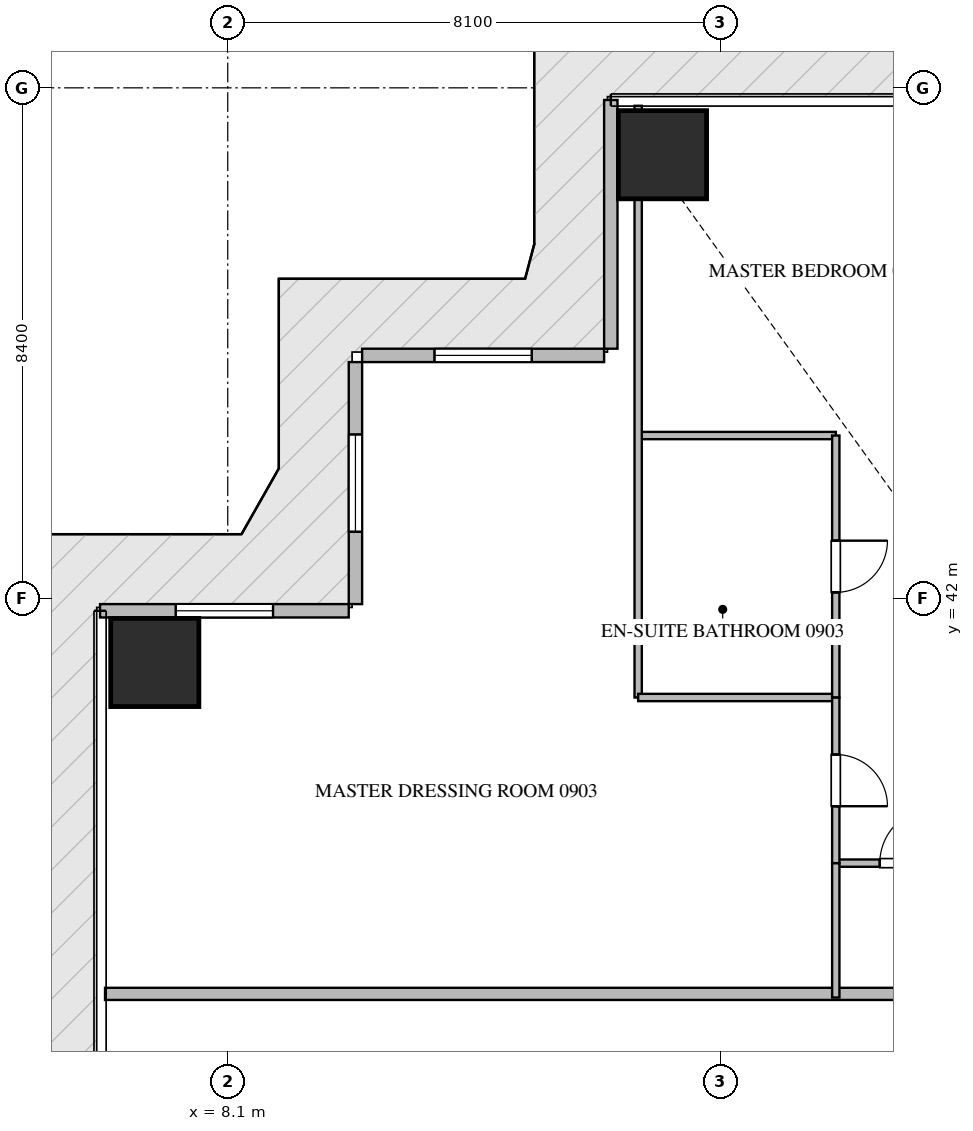
"""IFC4 building model, lengths in metres.
Left out: names, types, materials, properties, quantities, classifications, styles, units other than length and angle.
Written with IfcOpenShell. Run it as: python <this file> out.ifc"""

import sys

from ifc_helpers import new_model, si_unit, direction, frame, frame_2d, origin, origin_2d, place, context, subcontext, project, spatial, rectangle, extrude, source, transform, mapped, element, fill, save


model = new_model("IFC4")
c1 = context("Model", 3, precision=1e-05, world=origin(), true_north=direction((0.0, 1.0)))
c2 = subcontext(c1, "Body", "Model", "MODEL_VIEW")
j1 = project(units=[si_unit("LENGTHUNIT", "METRE"), si_unit("PLANEANGLEUNIT", "RADIAN")], contexts=[c1])
p1 = place(None, origin())
s1 = spatial("IfcSite", under=j1, at=p1, CompositionType="ELEMENT")
p2 = place(p1, origin())
s2 = spatial("IfcBuilding", under=s1, at=p2, CompositionType="ELEMENT")
p3 = place(p2, frame((0.0, 0.0, 41.7)))
s3 = spatial("IfcBuildingStorey", under=s2, at=p3, CompositionType="ELEMENT", Elevation=41.7)
m1 = source(origin(), c2, "Body", "SweptSolid", [
    extrude(rectangle(XDim=1.45, YDim=1.45, at=origin_2d()), origin(), (0.0, 0.0, 1.0), 3.75),
])
for number, where, z_axis, x_axis in (
    (1, (15.25, 49.3, -0.26), (0.0, 0.0, 1.0), (1.0, 0.0, 0.0)),
    (2, (6.9, 40.95, -0.26), (0.0, 0.0, 1.0), (1.0, 0.0, 0.0)),
):
    element("IfcColumn", number, at=place(p3, frame(where, z_axis=z_axis, x_axis=x_axis)), inside=s3, PredefinedType="COLUMN", context=c2, shape_type="MappedRepresentation", body=[
        mapped(m1, transform((0.0, 0.0, 0.0), scale=1.0)),
    ])
p4 = place(p3, frame((14.4, 50.2, 0.0), z_axis=(0.0, 0.0, 1.0), x_axis=(0.0, -1.0, 0.0)))
e3 = element("IfcWall", 3, at=p4, inside=s3, PredefinedType="ELEMENTEDWALL", context=c2, shape_type="SweptSolid", body=[
    extrude(rectangle(XDim=4.09, YDim=0.22, at=frame_2d((2.045, 0.0))), origin(), (0.0, 0.0, 1.0), 3.475),
])
p5 = place(p3, frame((14.29, 46.0, 0.0), z_axis=(0.0, 0.0, 1.0), x_axis=(-1.0, 0.0, 0.0)))
e4 = element("IfcWall", 4, at=p5, inside=s3, PredefinedType="ELEMENTEDWALL", context=c2, shape_type="SweptSolid", body=[
    extrude(rectangle(XDim=3.98, YDim=0.22, at=frame_2d((1.99, 0.0))), origin(), (0.0, 0.0, 1.0), 3.475),
])
p6 = place(p5, frame((1.19, 0.0, 0.65)))
e5 = element("IfcOpeningElement", 5, at=p6, cuts=e4, PredefinedType="OPENING", context=c2, shape_type="SweptSolid", body=[
    extrude(rectangle(XDim=1.6, YDim=2.1, at=frame_2d((0.8, 1.05))), frame((0.0, 0.12, 0.0), z_axis=(0.0, -1.0, 0.0), x_axis=(1.0, 0.0, 0.0)), (0.0, 0.0, 1.0), 0.24),
])
p7 = place(p3, frame((10.2, 45.89, 0.0), z_axis=(0.0, 0.0, 1.0), x_axis=(0.0, -1.0, 0.0)))
e6 = element("IfcWall", 6, at=p7, inside=s3, PredefinedType="ELEMENTEDWALL", context=c2, shape_type="SweptSolid", body=[
    extrude(rectangle(XDim=3.98, YDim=0.22, at=frame_2d((1.99, 0.0))), origin(), (0.0, 0.0, 1.0), 3.475),
])
p8 = place(p7, frame((1.19, 0.0, 0.65)))
e7 = element("IfcOpeningElement", 7, at=p8, cuts=e6, PredefinedType="OPENING", context=c2, shape_type="SweptSolid", body=[
    extrude(rectangle(XDim=1.6, YDim=2.1, at=frame_2d((0.8, 1.05))), frame((0.0, 0.12, 0.0), z_axis=(0.0, -1.0, 0.0), x_axis=(1.0, 0.0, 0.0)), (0.0, 0.0, 1.0), 0.24),
])
p9 = place(p3, frame((10.09, 41.8, 0.0), z_axis=(0.0, 0.0, 1.0), x_axis=(-1.0, 0.0, 0.0)))
e8 = element("IfcWall", 8, at=p9, inside=s3, PredefinedType="ELEMENTEDWALL", context=c2, shape_type="SweptSolid", body=[
    extrude(rectangle(XDim=4.09, YDim=0.22, at=frame_2d((2.045, 0.0))), origin(), (0.0, 0.0, 1.0), 3.475),
])
p10 = place(p9, frame((1.245, 0.0, 0.65)))
e9 = element("IfcOpeningElement", 9, at=p10, cuts=e8, PredefinedType="OPENING", context=c2, shape_type="SweptSolid", body=[
    extrude(rectangle(XDim=1.6, YDim=2.1, at=frame_2d((0.8, 1.05))), frame((0.0, 0.12, 0.0), z_axis=(0.0, -1.0, 0.0), x_axis=(1.0, 0.0, 0.0)), (0.0, 0.0, 1.0), 0.24),
])
p11 = place(p3, frame((6.082, 35.5, 0.0), z_axis=(0.0, 0.0, 1.0), x_axis=(1.0, 0.0, 0.0)))
e10 = element("IfcWall", 10, at=p11, inside=s3, PredefinedType="PARTITIONING", context=c2, shape_type="SweptSolid", body=[
    extrude(rectangle(XDim=15.318, YDim=0.2, at=frame_2d((7.659, 0.0))), origin(), (0.0, 0.0, 1.0), 3.49),
])
p12 = place(p3, frame((18.1, 37.65, 0.0), z_axis=(0.0, 0.0, 1.0), x_axis=(1.0, 0.0, 0.0)))
e11 = element("IfcWall", 11, at=p12, inside=s3, PredefinedType="PARTITIONING", context=c2, shape_type="SweptSolid", body=[
    extrude(rectangle(XDim=2.348, YDim=0.12, at=frame_2d((1.174, 0.0))), origin(), (0.0, 0.0, 1.0), 3.49),
])
p13 = place(p12, frame((0.724, 0.0, 0.0)))
e12 = element("IfcOpeningElement", 12, at=p13, cuts=e11, PredefinedType="OPENING", context=c2, shape_type="SweptSolid", body=[
    extrude(rectangle(XDim=0.9, YDim=2.1, at=frame_2d((0.45, 1.05))), frame((0.0, 0.07, 0.0), z_axis=(0.0, -1.0, 0.0), x_axis=(1.0, 0.0, 0.0)), (0.0, 0.0, 1.0), 0.14),
])
p14 = place(p3, frame((14.85, 44.682, 0.0), z_axis=(0.0, 0.0, 1.0), x_axis=(1.0, 0.0, 0.0)))
e13 = element("IfcWall", 13, at=p14, inside=s3, PredefinedType="PARTITIONING", context=c2, shape_type="SweptSolid", body=[
    extrude(rectangle(XDim=3.25, YDim=0.12, at=frame_2d((1.625, 0.0))), origin(), (0.0, 0.0, 1.0), 3.49),
])
p15 = place(p3, frame((14.85, 50.105, 0.0), z_axis=(0.0, 0.0, 1.0), x_axis=(0.0, -1.0, 0.0)))
e14 = element("IfcWall", 14, at=p15, inside=s3, PredefinedType="PARTITIONING", context=c2, shape_type="SweptSolid", body=[
    extrude(rectangle(XDim=9.731, YDim=0.12, at=frame_2d((4.865, 0.0))), origin(), (0.0, 0.0, 1.0), 3.49),
])
p16 = place(p3, frame((14.85, 40.374, 0.0), z_axis=(0.0, 0.0, 1.0), x_axis=(1.0, 0.0, 0.0)))
e15 = element("IfcWall", 15, at=p16, inside=s3, PredefinedType="PARTITIONING", context=c2, shape_type="SweptSolid", body=[
    extrude(rectangle(XDim=3.25, YDim=0.12, at=frame_2d((1.625, 0.0))), origin(), (0.0, 0.0, 1.0), 3.49),
])
p17 = place(p3, frame((18.1, 44.682, 0.0), z_axis=(0.0, 0.0, 1.0), x_axis=(0.0, -1.0, 0.0)))
e16 = element("IfcWall", 16, at=p17, inside=s3, PredefinedType="PARTITIONING", context=c2, shape_type="SweptSolid", body=[
    extrude(rectangle(XDim=4.308, YDim=0.12, at=frame_2d((2.154, 0.0))), origin(), (0.0, 0.0, 1.0), 3.49),
])
p18 = place(p17, frame((1.729, 0.0, 0.0)))
e17 = element("IfcOpeningElement", 17, at=p18, cuts=e16, PredefinedType="OPENING", context=c2, shape_type="SweptSolid", body=[
    extrude(rectangle(XDim=0.85, YDim=2.1, at=frame_2d((0.425, 1.05))), frame((0.0, 0.07, 0.0), z_axis=(0.0, -1.0, 0.0), x_axis=(1.0, 0.0, 0.0)), (0.0, 0.0, 1.0), 0.14),
])
p19 = place(p3, frame((18.1, 40.372, 0.0), z_axis=(0.0, 0.0, 1.0), x_axis=(0.0, -1.0, 0.0)))
e18 = element("IfcWall", 18, at=p19, inside=s3, PredefinedType="PARTITIONING", context=c2, shape_type="SweptSolid", body=[
    extrude(rectangle(XDim=2.722, YDim=0.12, at=frame_2d((1.361, 0.0))), origin(), (0.0, 0.0, 1.0), 3.49),
])
p20 = place(p19, frame((0.936, 0.0, 0.0)))
e19 = element("IfcOpeningElement", 19, at=p20, cuts=e18, PredefinedType="OPENING", context=c2, shape_type="SweptSolid", body=[
    extrude(rectangle(XDim=0.85, YDim=2.1, at=frame_2d((0.425, 1.05))), frame((0.0, 0.07, 0.0), z_axis=(0.0, -1.0, 0.0), x_axis=(1.0, 0.0, 0.0)), (0.0, 0.0, 1.0), 0.14),
])
p21 = place(p3, frame((18.1, 37.648, 0.0), z_axis=(0.0, 0.0, 1.0), x_axis=(0.0, -1.0, 0.0)))
e20 = element("IfcWall", 20, at=p21, inside=s3, PredefinedType="PARTITIONING", context=c2, shape_type="SweptSolid", body=[
    extrude(rectangle(XDim=2.208, YDim=0.12, at=frame_2d((1.104, 0.0))), origin(), (0.0, 0.0, 1.0), 3.49),
])
m2 = source(origin(), c2, "Body", "SweptSolid", [
    extrude(rectangle(XDim=1.6, YDim=2.1, at=frame_2d((0.8, 1.05))), frame((0.0, 0.03, 0.0), z_axis=(0.0, -1.0, 0.0), x_axis=(1.0, 0.0, 0.0)), (0.0, 0.0, 1.0), 0.06),
])
p22 = place(p6, origin())
e21 = element("IfcWindow", 21, at=p22, inside=s3, PartitioningType="SINGLE_PANEL", PredefinedType="WINDOW", context=c2, shape_type="MappedRepresentation", body=[
    mapped(m2, transform((0.0, 0.0, 0.0), scale=1.0)),
])
fill(e5, e21)
p23 = place(p8, origin())
e22 = element("IfcWindow", 22, at=p23, inside=s3, PartitioningType="SINGLE_PANEL", PredefinedType="WINDOW", context=c2, shape_type="MappedRepresentation", body=[
    mapped(m2, transform((0.0, 0.0, 0.0), scale=1.0)),
])
fill(e7, e22)
p24 = place(p10, origin())
e23 = element("IfcWindow", 23, at=p24, inside=s3, PartitioningType="SINGLE_PANEL", PredefinedType="WINDOW", context=c2, shape_type="MappedRepresentation", body=[
    mapped(m2, transform((0.0, 0.0, 0.0), scale=1.0)),
])
fill(e9, e23)
m3 = source(origin(), c2, "Body", "SweptSolid", [
    extrude(rectangle(XDim=0.9, YDim=2.1, at=frame_2d((0.45, 1.05))), frame((0.0, 0.025, 0.0), z_axis=(0.0, -1.0, 0.0), x_axis=(1.0, 0.0, 0.0)), (0.0, 0.0, 1.0), 0.05),
])
p25 = place(p13, origin())
e24 = element("IfcDoor", 24, at=p25, inside=s3, OperationType="SINGLE_SWING_RIGHT", PredefinedType="DOOR", context=c2, shape_type="MappedRepresentation", body=[
    mapped(m3, transform((0.0, 0.0, 0.0), scale=1.0)),
])
fill(e12, e24)
m4 = source(origin(), c2, "Body", "SweptSolid", [
    extrude(rectangle(XDim=0.85, YDim=2.1, at=frame_2d((0.425, 1.05))), frame((0.0, 0.025, 0.0), z_axis=(0.0, -1.0, 0.0), x_axis=(1.0, 0.0, 0.0)), (0.0, 0.0, 1.0), 0.05),
])
p26 = place(p18, origin())
e25 = element("IfcDoor", 25, at=p26, inside=s3, OperationType="SINGLE_SWING_LEFT", PredefinedType="DOOR", context=c2, shape_type="MappedRepresentation", body=[
    mapped(m4, transform((0.0, 0.0, 0.0), scale=1.0)),
])
fill(e17, e25)
p27 = place(p20, origin())
e26 = element("IfcDoor", 26, at=p27, inside=s3, OperationType="SINGLE_SWING_RIGHT", PredefinedType="DOOR", context=c2, shape_type="MappedRepresentation", body=[
    mapped(m4, transform((0.0, 0.0, 0.0), scale=1.0)),
])
fill(e19, e26)
save(model, sys.argv[1])
